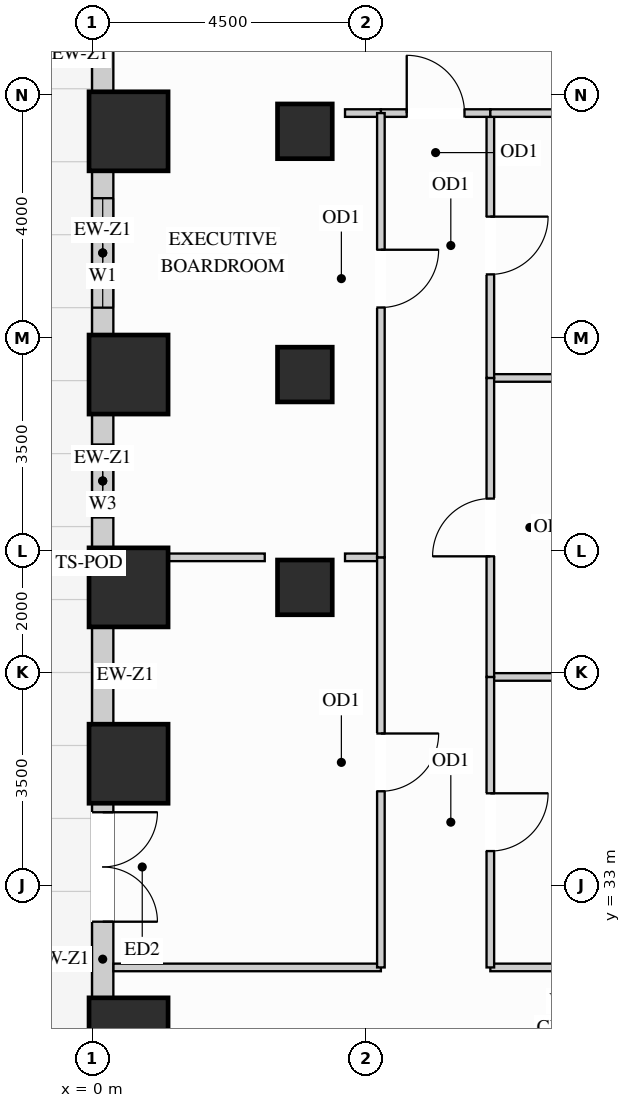
"""IFC4 building model, lengths in metres.
Left out: names, types, materials, properties, quantities, classifications, styles, units other than length and angle.
Written with IfcOpenShell. Run it as: python <this file> out.ifc"""

import sys

from ifc_helpers import new_model, si_unit, direction, frame, frame_2d, origin, origin_2d, place, context, subcontext, project, spatial, rectangle, extrude, source, transform, mapped, element, fill, save


model = new_model("IFC4")
c1 = context("Model", 3, precision=1e-05, world=origin(), true_north=direction((0.0, 1.0)))
c2 = subcontext(c1, "Body", "Model", "MODEL_VIEW")
j1 = project(units=[si_unit("LENGTHUNIT", "METRE"), si_unit("PLANEANGLEUNIT", "RADIAN")], contexts=[c1])
p1 = place(None, origin())
s1 = spatial("IfcSite", under=j1, at=p1, CompositionType="ELEMENT")
p2 = place(p1, origin())
s2 = spatial("IfcBuilding", under=s1, at=p2, CompositionType="ELEMENT")
p3 = place(p2, frame((0.0, 0.0, 22.5)))
s3 = spatial("IfcBuildingStorey", under=s2, at=p3, CompositionType="ELEMENT", Elevation=22.5)
m1 = source(origin(), c2, "Body", "SweptSolid", [
    extrude(rectangle(XDim=0.9, YDim=0.9, at=origin_2d()), origin(), (0.0, 0.0, 1.0), 3.38),
])
for number, where, z_axis, x_axis in (
    (1, (3.5, 37.9, 0.0), (0.0, 0.0, 1.0), (1.0, 0.0, 0.0)),
    (2, (3.5, 41.4, 0.0), (0.0, 0.0, 1.0), (1.0, 0.0, 0.0)),
    (3, (3.5, 45.4, 0.0), (0.0, 0.0, 1.0), (1.0, 0.0, 0.0)),
):
    element("IfcColumn", number, at=place(p3, frame(where, z_axis=z_axis, x_axis=x_axis)), inside=s3, PredefinedType="COLUMN", context=c2, shape_type="MappedRepresentation", body=[
        mapped(m1, transform((0.0, 0.0, 0.0), x_axis=(1.0, 0.0, 0.0), y_axis=(0.0, 1.0, 0.0), z_axis=(0.0, 0.0, 1.0))),
    ])
m2 = source(origin(), c2, "Body", "SweptSolid", [
    extrude(rectangle(XDim=1.3, YDim=1.3, at=origin_2d()), origin(), (0.0, 0.0, 1.0), 3.38),
])
for number, where, z_axis, x_axis in (
    (4, (0.6, 30.5, 0.0), (0.0, 0.0, 1.0), (1.0, 0.0, 0.0)),
    (5, (0.6, 35.0, 0.0), (0.0, 0.0, 1.0), (1.0, 0.0, 0.0)),
    (6, (0.6, 37.9, 0.0), (0.0, 0.0, 1.0), (1.0, 0.0, 0.0)),
    (7, (0.6, 41.4, 0.0), (0.0, 0.0, 1.0), (1.0, 0.0, 0.0)),
    (8, (0.6, 45.4, 0.0), (0.0, 0.0, 1.0), (1.0, 0.0, 0.0)),
):
    element("IfcColumn", number, at=place(p3, frame(where, z_axis=z_axis, x_axis=x_axis)), inside=s3, PredefinedType="COLUMN", context=c2, shape_type="MappedRepresentation", body=[
        mapped(m2, transform((0.0, 0.0, 0.0), x_axis=(1.0, 0.0, 0.0), y_axis=(0.0, 1.0, 0.0), z_axis=(0.0, 0.0, 1.0))),
    ])
m3 = source(origin(), c2, "Body", "SweptSolid", [
    extrude(rectangle(XDim=1.104, YDim=0.35, at=frame_2d((0.552, 0.0))), origin(), (0.0, 0.0, 1.0), 3.365),
])
p4 = place(p3, frame((0.175, 47.152, 0.0), z_axis=(0.0, 0.0, 1.0), x_axis=(0.0, -1.0, 0.0)))
e9 = element("IfcWall", 9, at=p4, inside=s3, PredefinedType="SOLIDWALL", context=c2, shape_type="MappedRepresentation", body=[
    mapped(m3, transform((0.0, 0.0, 0.0), x_axis=(1.0, 0.0, 0.0), y_axis=(0.0, 1.0, 0.0), z_axis=(0.0, 0.0, 1.0))),
])
p5 = place(p3, frame((0.175, 44.752, 0.0), z_axis=(0.0, 0.0, 1.0), x_axis=(0.0, -1.0, 0.0)))
e10 = element("IfcWall", 10, at=p5, inside=s3, PredefinedType="SOLIDWALL", context=c2, shape_type="SweptSolid", body=[
    extrude(rectangle(XDim=2.704, YDim=0.35, at=frame_2d((1.352, 0.0))), origin(), (0.0, 0.0, 1.0), 2.51),
])
p6 = place(p5, frame((0.452, 0.0, 0.78)))
e11 = element("IfcOpeningElement", 11, at=p6, cuts=e10, PredefinedType="OPENING", context=c2, shape_type="SweptSolid", body=[
    extrude(rectangle(XDim=1.8, YDim=1.55, at=frame_2d((0.9, 0.775))), frame((0.0, 0.185, 0.0), z_axis=(0.0, -1.0, 0.0), x_axis=(1.0, 0.0, 0.0)), (0.0, 0.0, 1.0), 0.37),
])
p7 = place(p3, frame((0.175, 40.752, 0.0), z_axis=(0.0, 0.0, 1.0), x_axis=(0.0, -1.0, 0.0)))
e12 = element("IfcWall", 12, at=p7, inside=s3, PredefinedType="SOLIDWALL", context=c2, shape_type="SweptSolid", body=[
    extrude(rectangle(XDim=2.204, YDim=0.35, at=frame_2d((1.102, 0.0))), origin(), (0.0, 0.0, 1.0), 2.51),
])
p8 = place(p7, frame((0.502, 0.0, 0.78)))
e13 = element("IfcOpeningElement", 13, at=p8, cuts=e12, PredefinedType="OPENING", context=c2, shape_type="SweptSolid", body=[
    extrude(rectangle(XDim=1.2, YDim=1.55, at=frame_2d((0.6, 0.775))), frame((0.0, 0.185, 0.0), z_axis=(0.0, -1.0, 0.0), x_axis=(1.0, 0.0, 0.0)), (0.0, 0.0, 1.0), 0.37),
])
m4 = source(origin(), c2, "Body", "SweptSolid", [
    extrude(rectangle(XDim=1.604, YDim=0.35, at=frame_2d((0.802, 0.0))), origin(), (0.0, 0.0, 1.0), 2.51),
])
p9 = place(p3, frame((0.175, 37.252, 0.0), z_axis=(0.0, 0.0, 1.0), x_axis=(0.0, -1.0, 0.0)))
e14 = element("IfcWall", 14, at=p9, inside=s3, PredefinedType="SOLIDWALL", context=c2, shape_type="MappedRepresentation", body=[
    mapped(m4, transform((0.0, 0.0, 0.0), x_axis=(1.0, 0.0, 0.0), y_axis=(0.0, 1.0, 0.0), z_axis=(0.0, 0.0, 1.0))),
])
p10 = place(p3, frame((0.175, 34.352, 0.0), z_axis=(0.0, 0.0, 1.0), x_axis=(0.0, -1.0, 0.0)))
e15 = element("IfcWall", 15, at=p10, inside=s3, PredefinedType="SOLIDWALL", context=c2, shape_type="SweptSolid", body=[
    extrude(rectangle(XDim=3.204, YDim=0.35, at=frame_2d((1.602, 0.0))), origin(), (0.0, 0.0, 1.0), 2.51),
])
p11 = place(p10, frame((0.15, 0.0, 0.0)))
e16 = element("IfcOpeningElement", 16, at=p11, cuts=e15, PredefinedType="OPENING", context=c2, shape_type="SweptSolid", body=[
    extrude(rectangle(XDim=1.8, YDim=2.2, at=frame_2d((0.9, 1.1))), frame((0.0, 0.185, 0.0), z_axis=(0.0, -1.0, 0.0), x_axis=(1.0, 0.0, 0.0)), (0.0, 0.0, 1.0), 0.37),
])
m5 = source(origin(), c2, "Body", "SweptSolid", [
    extrude(rectangle(XDim=12.598, YDim=0.125, at=frame_2d((6.299, 0.0))), origin(), (0.0, 0.0, 1.0), 2.828),
])
p12 = place(p3, frame((6.55, 36.427, 0.0), z_axis=(0.0, 0.0, 1.0), x_axis=(1.0, 0.0, 0.0)))
e17 = element("IfcWall", 17, at=p12, inside=s3, PredefinedType="PARTITIONING", context=c2, shape_type="MappedRepresentation", body=[
    mapped(m5, transform((0.0, 0.0, 0.0), x_axis=(1.0, 0.0, 0.0), y_axis=(0.0, 1.0, 0.0), z_axis=(0.0, 0.0, 1.0))),
])
m6 = source(origin(), c2, "Body", "SweptSolid", [
    extrude(rectangle(XDim=1.79, YDim=0.125, at=frame_2d((0.895, 0.0))), origin(), (0.0, 0.0, 1.0), 2.67),
])
p13 = place(p3, frame((6.55, 41.344, 0.0), z_axis=(0.0, 0.0, 1.0), x_axis=(1.0, 0.0, 0.0)))
e18 = element("IfcWall", 18, at=p13, inside=s3, PredefinedType="PARTITIONING", context=c2, shape_type="MappedRepresentation", body=[
    mapped(m6, transform((0.0, 0.0, 0.0), x_axis=(1.0, 0.0, 0.0), y_axis=(0.0, 1.0, 0.0), z_axis=(0.0, 0.0, 1.0))),
])
p14 = place(p3, frame((6.55, 31.65, 0.0), z_axis=(0.0, 0.0, 1.0), x_axis=(1.0, 0.0, 0.0)))
e19 = element("IfcWall", 19, at=p14, inside=s3, PredefinedType="PARTITIONING", context=c2, shape_type="MappedRepresentation", body=[
    mapped(m5, transform((0.0, 0.0, 0.0), x_axis=(1.0, 0.0, 0.0), y_axis=(0.0, 1.0, 0.0), z_axis=(0.0, 0.0, 1.0))),
])
m7 = source(origin(), c2, "Body", "SweptSolid", [
    extrude(rectangle(XDim=4.398, YDim=0.125, at=frame_2d((2.199, 0.0))), origin(), (0.0, 0.0, 1.0), 2.828),
])
p15 = place(p3, frame((0.352, 31.65, 0.0), z_axis=(0.0, 0.0, 1.0), x_axis=(1.0, 0.0, 0.0)))
e20 = element("IfcWall", 20, at=p15, inside=s3, PredefinedType="PARTITIONING", context=c2, shape_type="MappedRepresentation", body=[
    mapped(m7, transform((0.0, 0.0, 0.0), x_axis=(1.0, 0.0, 0.0), y_axis=(0.0, 1.0, 0.0), z_axis=(0.0, 0.0, 1.0))),
])
m8 = source(origin(), c2, "Body", "SweptSolid", [
    extrude(rectangle(XDim=1.58, YDim=0.125, at=frame_2d((0.79, 0.0))), origin(), (0.0, 0.0, 1.0), 3.365),
])
p16 = place(p3, frame((1.26, 38.394, 0.0), z_axis=(0.0, 0.0, 1.0), x_axis=(1.0, 0.0, 0.0)))
e21 = element("IfcWall", 21, at=p16, inside=s3, PredefinedType="PARTITIONING", context=c2, shape_type="MappedRepresentation", body=[
    mapped(m8, transform((0.0, 0.0, 0.0), x_axis=(1.0, 0.0, 0.0), y_axis=(0.0, 1.0, 0.0), z_axis=(0.0, 0.0, 1.0))),
])
m9 = source(origin(), c2, "Body", "SweptSolid", [
    extrude(rectangle(XDim=0.59, YDim=0.125, at=frame_2d((0.295, 0.0))), origin(), (0.0, 0.0, 1.0), 3.365),
])
p17 = place(p3, frame((4.16, 38.394, 0.0), z_axis=(0.0, 0.0, 1.0), x_axis=(1.0, 0.0, 0.0)))
e22 = element("IfcWall", 22, at=p17, inside=s3, PredefinedType="PARTITIONING", context=c2, shape_type="MappedRepresentation", body=[
    mapped(m9, transform((0.0, 0.0, 0.0), x_axis=(1.0, 0.0, 0.0), y_axis=(0.0, 1.0, 0.0), z_axis=(0.0, 0.0, 1.0))),
])
p18 = place(p3, frame((6.55, 31.65, 0.0), z_axis=(0.0, 0.0, 1.0), x_axis=(0.0, 1.0, 0.0)))
e23 = element("IfcWall", 23, at=p18, inside=s3, PredefinedType="PARTITIONING", context=c2, shape_type="SweptSolid", body=[
    extrude(rectangle(XDim=4.777, YDim=0.125, at=frame_2d((2.389, 0.0))), origin(), (0.0, 0.0, 1.0), 3.365),
])
p19 = place(p18, frame((1.914, 0.0, 0.0)))
e24 = element("IfcOpeningElement", 24, at=p19, cuts=e23, PredefinedType="OPENING", context=c2, shape_type="SweptSolid", body=[
    extrude(rectangle(XDim=0.95, YDim=2.15, at=frame_2d((0.475, 1.075))), frame((0.0, 0.073, 0.0), z_axis=(0.0, -1.0, 0.0), x_axis=(1.0, 0.0, 0.0)), (0.0, 0.0, 1.0), 0.145),
])
p20 = place(p3, frame((6.55, 36.427, 0.0), z_axis=(0.0, 0.0, 1.0), x_axis=(0.0, 1.0, 0.0)))
e25 = element("IfcWall", 25, at=p20, inside=s3, PredefinedType="PARTITIONING", context=c2, shape_type="SweptSolid", body=[
    extrude(rectangle(XDim=4.917, YDim=0.125, at=frame_2d((2.458, 0.0))), origin(), (0.0, 0.0, 1.0), 3.365),
])
p21 = place(p20, frame((1.983, 0.0, 0.0)))
e26 = element("IfcOpeningElement", 26, at=p21, cuts=e25, PredefinedType="OPENING", context=c2, shape_type="SweptSolid", body=[
    extrude(rectangle(XDim=0.95, YDim=2.15, at=frame_2d((0.475, 1.075))), frame((0.0, 0.073, 0.0), z_axis=(0.0, -1.0, 0.0), x_axis=(1.0, 0.0, 0.0)), (0.0, 0.0, 1.0), 0.145),
])
p22 = place(p3, frame((6.55, 41.344, 0.0), z_axis=(0.0, 0.0, 1.0), x_axis=(0.0, 1.0, 0.0)))
e27 = element("IfcWall", 27, at=p22, inside=s3, PredefinedType="PARTITIONING", context=c2, shape_type="SweptSolid", body=[
    extrude(rectangle(XDim=4.356, YDim=0.125, at=frame_2d((2.178, 0.0))), origin(), (0.0, 0.0, 1.0), 3.365),
])
p23 = place(p22, frame((1.703, 0.0, 0.0)))
e28 = element("IfcOpeningElement", 28, at=p23, cuts=e27, PredefinedType="OPENING", context=c2, shape_type="SweptSolid", body=[
    extrude(rectangle(XDim=0.95, YDim=2.15, at=frame_2d((0.475, 1.075))), frame((0.0, 0.073, 0.0), z_axis=(0.0, -1.0, 0.0), x_axis=(1.0, 0.0, 0.0)), (0.0, 0.0, 1.0), 0.145),
])
p24 = place(p3, frame((4.75, 45.7, 0.0), z_axis=(0.0, 0.0, 1.0), x_axis=(1.0, 0.0, 0.0)))
e29 = element("IfcWall", 29, at=p24, inside=s3, PredefinedType="PARTITIONING", context=c2, shape_type="SweptSolid", body=[
    extrude(rectangle(XDim=1.8, YDim=0.125, at=frame_2d((0.9, 0.0))), origin(), (0.0, 0.0, 1.0), 2.67),
])
p25 = place(p24, frame((0.425, 0.0, 0.0)))
e30 = element("IfcOpeningElement", 30, at=p25, cuts=e29, PredefinedType="OPENING", context=c2, shape_type="SweptSolid", body=[
    extrude(rectangle(XDim=0.95, YDim=2.15, at=frame_2d((0.475, 1.075))), frame((0.0, 0.073, 0.0), z_axis=(0.0, -1.0, 0.0), x_axis=(1.0, 0.0, 0.0)), (0.0, 0.0, 1.0), 0.145),
])
p26 = place(p3, frame((6.55, 45.7, 0.0), z_axis=(0.0, 0.0, 1.0), x_axis=(1.0, 0.0, 0.0)))
e31 = element("IfcWall", 31, at=p26, inside=s3, PredefinedType="PARTITIONING", context=c2, shape_type="MappedRepresentation", body=[
    mapped(m6, transform((0.0, 0.0, 0.0), x_axis=(1.0, 0.0, 0.0), y_axis=(0.0, 1.0, 0.0), z_axis=(0.0, 0.0, 1.0))),
])
m10 = source(origin(), c2, "Body", "SweptSolid", [
    extrude(rectangle(XDim=0.59, YDim=0.125, at=frame_2d((0.295, 0.0))), origin(), (0.0, 0.0, 1.0), 2.67),
])
p27 = place(p3, frame((4.16, 45.7, 0.0), z_axis=(0.0, 0.0, 1.0), x_axis=(1.0, 0.0, 0.0)))
e32 = element("IfcWall", 32, at=p27, inside=s3, PredefinedType="PARTITIONING", context=c2, shape_type="MappedRepresentation", body=[
    mapped(m10, transform((0.0, 0.0, 0.0), x_axis=(1.0, 0.0, 0.0), y_axis=(0.0, 1.0, 0.0), z_axis=(0.0, 0.0, 1.0))),
])
p28 = place(p3, frame((4.75, 31.65, 0.0), z_axis=(0.0, 0.0, 1.0), x_axis=(0.0, 1.0, 0.0)))
e33 = element("IfcWall", 33, at=p28, inside=s3, PredefinedType="PARTITIONING", context=c2, shape_type="SweptSolid", body=[
    extrude(rectangle(XDim=6.744, YDim=0.125, at=frame_2d((3.372, 0.0))), origin(), (0.0, 0.0, 1.0), 3.365),
])
p29 = place(p28, frame((2.897, 0.0, 0.0)))
e34 = element("IfcOpeningElement", 34, at=p29, cuts=e33, PredefinedType="OPENING", context=c2, shape_type="SweptSolid", body=[
    extrude(rectangle(XDim=0.95, YDim=2.15, at=frame_2d((0.475, 1.075))), frame((0.0, 0.073, 0.0), z_axis=(0.0, -1.0, 0.0), x_axis=(1.0, 0.0, 0.0)), (0.0, 0.0, 1.0), 0.145),
])
p30 = place(p3, frame((4.75, 38.394, 0.0), z_axis=(0.0, 0.0, 1.0), x_axis=(0.0, 1.0, 0.0)))
e35 = element("IfcWall", 35, at=p30, inside=s3, PredefinedType="PARTITIONING", context=c2, shape_type="SweptSolid", body=[
    extrude(rectangle(XDim=7.306, YDim=0.125, at=frame_2d((3.653, 0.0))), origin(), (0.0, 0.0, 1.0), 3.365),
])
p31 = place(p30, frame((4.108, 0.0, 0.0)))
e36 = element("IfcOpeningElement", 36, at=p31, cuts=e35, PredefinedType="OPENING", context=c2, shape_type="SweptSolid", body=[
    extrude(rectangle(XDim=0.95, YDim=2.15, at=frame_2d((0.475, 1.075))), frame((0.0, 0.073, 0.0), z_axis=(0.0, -1.0, 0.0), x_axis=(1.0, 0.0, 0.0)), (0.0, 0.0, 1.0), 0.145),
])
m11 = source(origin(), c2, "Body", "SweptSolid", [
    extrude(rectangle(XDim=1.8, YDim=2.2, at=frame_2d((0.9, 1.1))), frame((0.0, 0.025, 0.0), z_axis=(0.0, -1.0, 0.0), x_axis=(1.0, 0.0, 0.0)), (0.0, 0.0, 1.0), 0.05),
])
p32 = place(p11, frame((1.8, 0.0, 0.0), z_axis=(0.0, 0.0, 1.0), x_axis=(-1.0, 0.0, 0.0)))
e37 = element("IfcDoor", 37, at=p32, inside=s3, OperationType="DOUBLE_DOOR_SINGLE_SWING", PredefinedType="DOOR", context=c2, shape_type="MappedRepresentation", body=[
    mapped(m11, transform((0.0, 0.0, 0.0), x_axis=(1.0, 0.0, 0.0), y_axis=(0.0, 1.0, 0.0), z_axis=(0.0, 0.0, 1.0))),
])
fill(e16, e37)
m12 = source(origin(), c2, "Body", "SweptSolid", [
    extrude(rectangle(XDim=0.95, YDim=2.15, at=frame_2d((0.475, 1.075))), frame((0.0, 0.025, 0.0), z_axis=(0.0, -1.0, 0.0), x_axis=(1.0, 0.0, 0.0)), (0.0, 0.0, 1.0), 0.05),
])
p33 = place(p19, origin())
e38 = element("IfcDoor", 38, at=p33, inside=s3, OperationType="SINGLE_SWING_RIGHT", PredefinedType="DOOR", context=c2, shape_type="MappedRepresentation", body=[
    mapped(m12, transform((0.0, 0.0, 0.0), x_axis=(1.0, 0.0, 0.0), y_axis=(0.0, 1.0, 0.0), z_axis=(0.0, 0.0, 1.0))),
])
fill(e24, e38)
p34 = place(p21, origin())
e39 = element("IfcDoor", 39, at=p34, inside=s3, OperationType="SINGLE_SWING_LEFT", PredefinedType="DOOR", context=c2, shape_type="MappedRepresentation", body=[
    mapped(m12, transform((0.0, 0.0, 0.0), x_axis=(1.0, 0.0, 0.0), y_axis=(0.0, 1.0, 0.0), z_axis=(0.0, 0.0, 1.0))),
])
fill(e26, e39)
p35 = place(p23, origin())
e40 = element("IfcDoor", 40, at=p35, inside=s3, OperationType="SINGLE_SWING_RIGHT", PredefinedType="DOOR", context=c2, shape_type="MappedRepresentation", body=[
    mapped(m12, transform((0.0, 0.0, 0.0), x_axis=(1.0, 0.0, 0.0), y_axis=(0.0, 1.0, 0.0), z_axis=(0.0, 0.0, 1.0))),
])
fill(e28, e40)
p36 = place(p25, origin())
e41 = element("IfcDoor", 41, at=p36, inside=s3, OperationType="SINGLE_SWING_LEFT", PredefinedType="DOOR", context=c2, shape_type="MappedRepresentation", body=[
    mapped(m12, transform((0.0, 0.0, 0.0), x_axis=(1.0, 0.0, 0.0), y_axis=(0.0, 1.0, 0.0), z_axis=(0.0, 0.0, 1.0))),
])
fill(e30, e41)
p37 = place(p29, origin())
e42 = element("IfcDoor", 42, at=p37, inside=s3, OperationType="SINGLE_SWING_RIGHT", PredefinedType="DOOR", context=c2, shape_type="MappedRepresentation", body=[
    mapped(m12, transform((0.0, 0.0, 0.0), x_axis=(1.0, 0.0, 0.0), y_axis=(0.0, 1.0, 0.0), z_axis=(0.0, 0.0, 1.0))),
])
fill(e34, e42)
p38 = place(p31, origin())
e43 = element("IfcDoor", 43, at=p38, inside=s3, OperationType="SINGLE_SWING_RIGHT", PredefinedType="DOOR", context=c2, shape_type="MappedRepresentation", body=[
    mapped(m12, transform((0.0, 0.0, 0.0), x_axis=(1.0, 0.0, 0.0), y_axis=(0.0, 1.0, 0.0), z_axis=(0.0, 0.0, 1.0))),
])
fill(e36, e43)
m13 = source(origin(), c2, "Body", "SweptSolid", [
    extrude(rectangle(XDim=1.8, YDim=1.55, at=frame_2d((0.9, 0.775))), frame((0.0, 0.03, 0.0), z_axis=(0.0, -1.0, 0.0), x_axis=(1.0, 0.0, 0.0)), (0.0, 0.0, 1.0), 0.06),
])
p39 = place(p6, origin())
e44 = element("IfcWindow", 44, at=p39, inside=s3, PartitioningType="SINGLE_PANEL", PredefinedType="WINDOW", context=c2, shape_type="MappedRepresentation", body=[
    mapped(m13, transform((0.0, 0.0, 0.0), x_axis=(1.0, 0.0, 0.0), y_axis=(0.0, 1.0, 0.0), z_axis=(0.0, 0.0, 1.0))),
])
fill(e11, e44)
m14 = source(origin(), c2, "Body", "SweptSolid", [
    extrude(rectangle(XDim=1.2, YDim=1.55, at=frame_2d((0.6, 0.775))), frame((0.0, 0.03, 0.0), z_axis=(0.0, -1.0, 0.0), x_axis=(1.0, 0.0, 0.0)), (0.0, 0.0, 1.0), 0.06),
])
p40 = place(p8, origin())
e45 = element("IfcWindow", 45, at=p40, inside=s3, PartitioningType="SINGLE_PANEL", PredefinedType="WINDOW", context=c2, shape_type="MappedRepresentation", body=[
    mapped(m14, transform((0.0, 0.0, 0.0), x_axis=(1.0, 0.0, 0.0), y_axis=(0.0, 1.0, 0.0), z_axis=(0.0, 0.0, 1.0))),
])
fill(e13, e45)
save(model, sys.argv[1])
